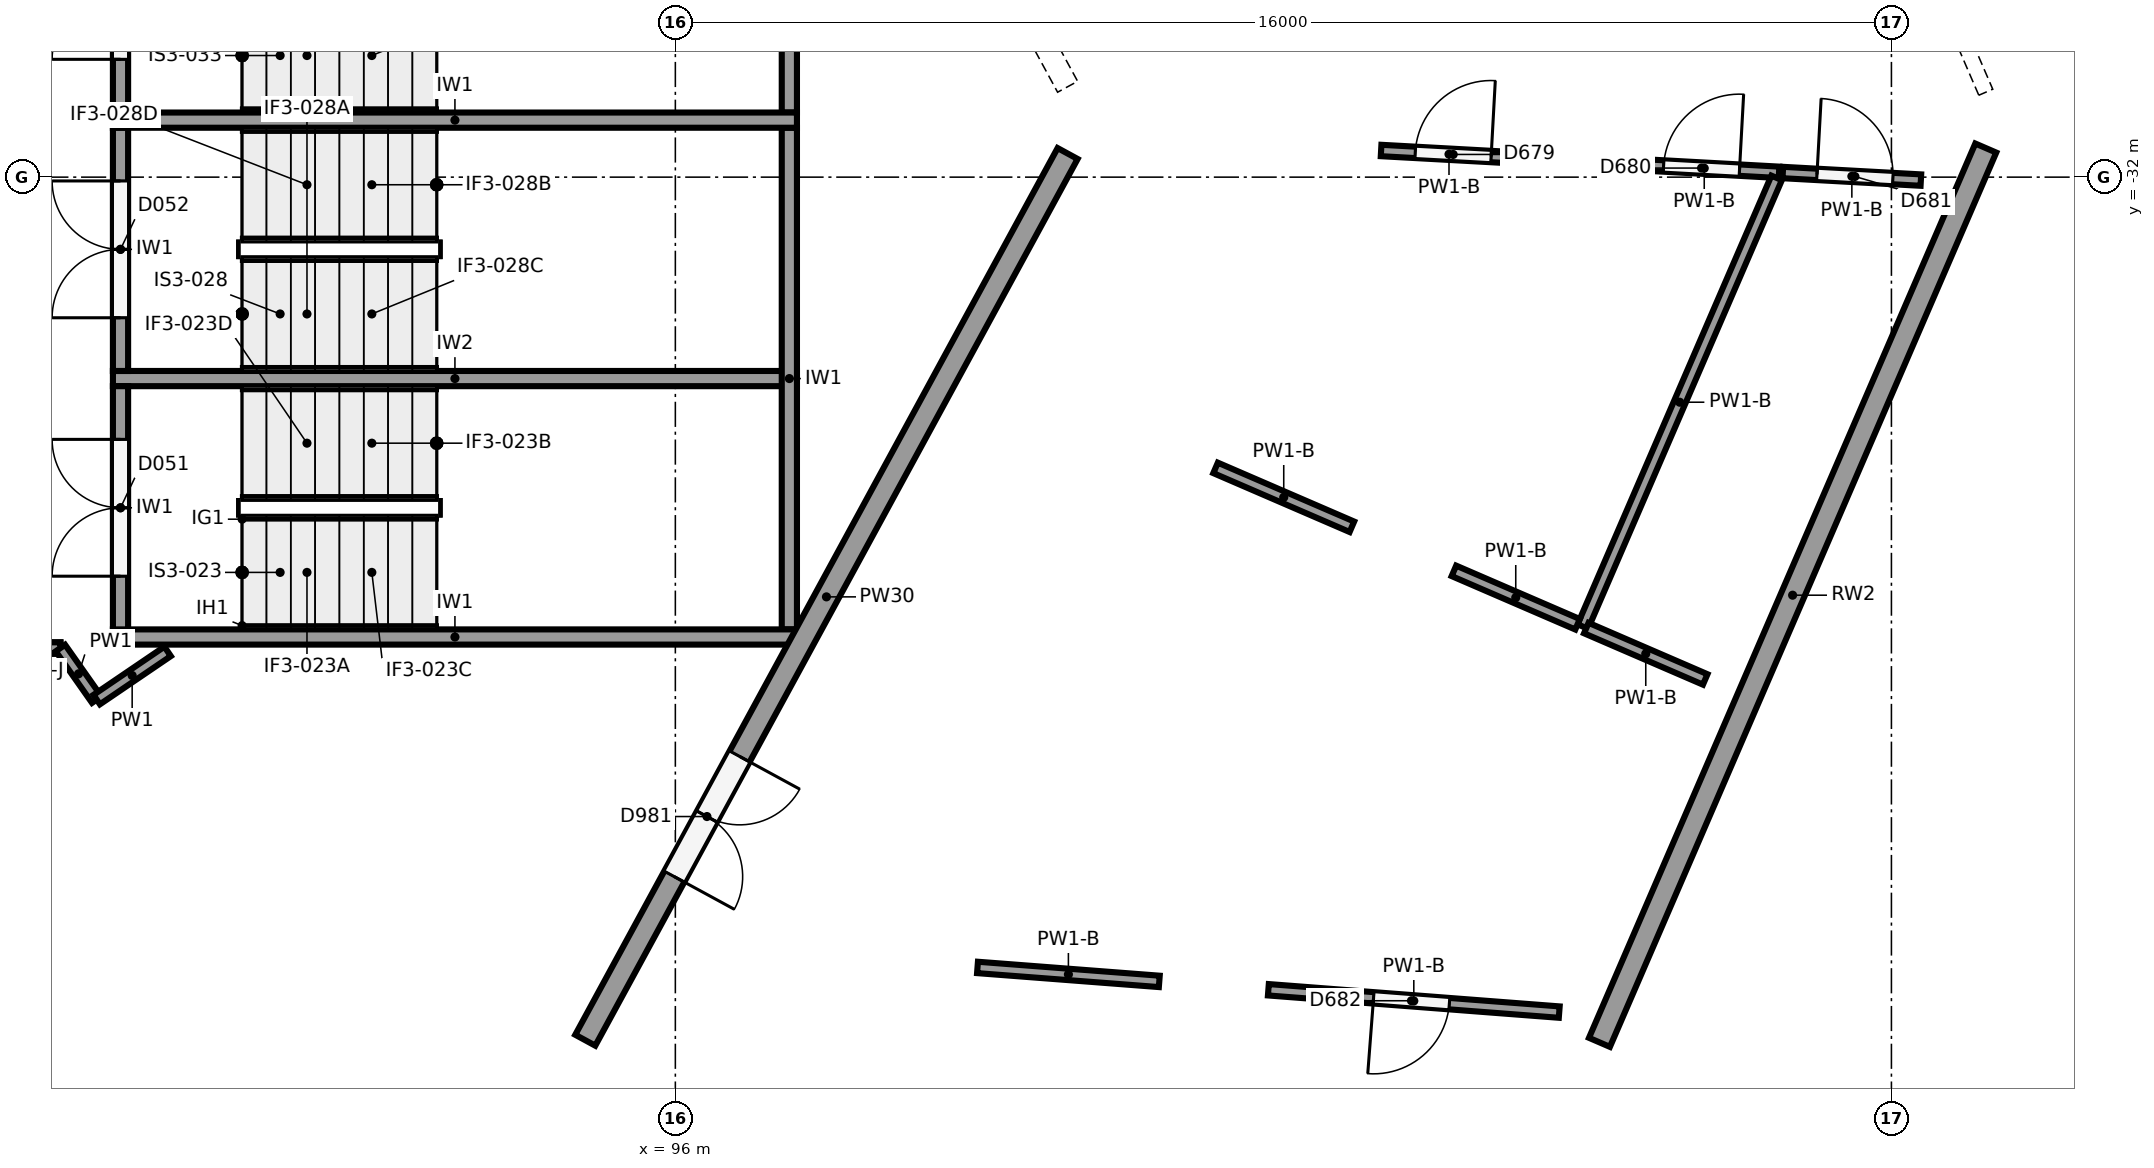
"""IFC4 building model, lengths in metres.
Left out: names, types, materials, properties, quantities, classifications, styles, units other than length and angle.
Written with IfcOpenShell. Run it as: python <this file> out.ifc"""

import sys

from ifc_helpers import new_model, si_unit, direction, frame, frame_2d, origin, origin_2d, place, context, subcontext, project, spatial, rectangle, circle, extrude, element, fill, save


model = new_model("IFC4")
c1 = context("Model", 3, precision=1e-05, world=origin(), true_north=direction((0.0, 1.0)))
c2 = subcontext(c1, "Body", "Model", "MODEL_VIEW")
j1 = project(units=[si_unit("LENGTHUNIT", "METRE"), si_unit("PLANEANGLEUNIT", "RADIAN")], contexts=[c1])
p1 = place(None, origin())
s1 = spatial("IfcSite", under=j1, at=p1, CompositionType="ELEMENT")
p2 = place(p1, origin())
s2 = spatial("IfcBuilding", under=s1, at=p2, CompositionType="ELEMENT")
p3 = place(p2, frame((0.0, 0.0, 6.5)))
s3 = spatial("IfcBuildingStorey", under=s2, at=p3, CompositionType="ELEMENT", Elevation=6.5)
p4 = place(p3, frame((94.6, -43.75, 0.0), z_axis=(0.0, 0.0, 1.0), x_axis=(1.0, 0.0, 0.0)))
e1 = element("IfcColumn", 1, at=p4, inside=s3, PredefinedType="COLUMN", context=c2, shape_type="SweptSolid", body=[
    extrude(circle(Radius=0.45, at=origin_2d()), origin(), (0.0, 0.0, 1.0), 5.5),
])
p5 = place(p3, frame((101.4, -31.25, 0.0), z_axis=(0.0, 0.0, 1.0), x_axis=(1.0, 0.0, 0.0)))
e2 = element("IfcColumn", 2, at=p5, inside=s3, PredefinedType="COLUMN", context=c2, shape_type="SweptSolid", body=[
    extrude(circle(Radius=0.5, at=origin_2d()), origin(), (0.0, 0.0, 1.0), 5.5),
])
for number, where, z_axis, x_axis in (
    (3, (98.6, -43.75, 0.0), (0.0, 0.0, 1.0), (1.0, 0.0, 0.0)),
    (4, (102.6, -43.75, 0.0), (0.0, 0.0, 1.0), (1.0, 0.0, 0.0)),
    (5, (108.0, -43.75, 0.0), (0.0, 0.0, 1.0), (1.0, 0.0, 0.0)),
    (6, (104.7, -31.25, 0.0), (0.0, 0.0, 1.0), (1.0, 0.0, 0.0)),
    (7, (108.0, -31.25, 0.0), (0.0, 0.0, 1.0), (1.0, 0.0, 0.0)),
    (8, (113.4, -31.25, 0.0), (0.0, 0.0, 1.0), (1.0, 0.0, 0.0)),
):
    element("IfcColumn", number, at=place(p3, frame(where, z_axis=z_axis, x_axis=x_axis)), inside=s3, PredefinedType="COLUMN", context=c2, shape_type="SweptSolid", body=[
        extrude(circle(Radius=0.4, at=origin_2d()), origin(), (0.0, 0.0, 1.0), 5.5),
    ])
p6 = place(p3, frame((113.241, -31.617, 0.0), z_axis=(0.0, 0.0, 1.0), x_axis=(-0.396577588261, -0.918001207237, 0.0)))
e9 = element("IfcWall", 9, at=p6, inside=s3, PredefinedType="SOLIDWALL", context=c2, shape_type="SweptSolid", body=[
    extrude(rectangle(XDim=12.817, YDim=0.3, at=frame_2d((6.408, 0.0))), origin(), (0.0, 0.0, 1.0), 3.85),
])
p7 = place(p3, frame((101.161, -31.689, 0.0), z_axis=(0.0, 0.0, 1.0), x_axis=(-0.477867771117, -0.878431780691, 0.0)))
e10 = element("IfcWall", 10, at=p7, inside=s3, PredefinedType="SOLIDWALL", context=c2, shape_type="SweptSolid", body=[
    extrude(rectangle(XDim=13.28, YDim=0.3, at=frame_2d((6.64, 0.0))), origin(), (0.0, 0.0, 1.0), 3.85),
])
p8 = place(p7, frame((9.03, 0.0, 0.0)))
e11 = element("IfcOpeningElement", 11, at=p8, cuts=e10, PredefinedType="OPENING", context=c2, shape_type="SweptSolid", body=[
    extrude(rectangle(XDim=1.8, YDim=2.4, at=frame_2d((0.9, 1.2))), frame((0.0, 0.16, 0.0), z_axis=(0.0, -1.0, 0.0), x_axis=(1.0, 0.0, 0.0)), (0.0, 0.0, 1.0), 0.32),
])
p9 = place(p3, frame((94.815, -19.145, 0.0), z_axis=(0.0, 0.0, 1.0), x_axis=(0.477867771117, -0.878431780691, 0.0)))
e12 = element("IfcWall", 12, at=p9, inside=s3, PredefinedType="SOLIDWALL", context=c2, shape_type="SweptSolid", body=[
    extrude(rectangle(XDim=13.28, YDim=0.3, at=frame_2d((6.64, 0.0))), origin(), (0.0, 0.0, 1.0), 3.85),
])
for number, where, z_axis, x_axis in (
    (13, (97.6, -38.05, 0.0), (0.0, 0.0, 1.0), (-1.0, 0.0, 0.0)),
    (14, (97.6, -31.25, 0.0), (0.0, 0.0, 1.0), (-1.0, 0.0, 0.0)),
):
    element("IfcWall", number, at=place(p3, frame(where, z_axis=z_axis, x_axis=x_axis)), inside=s3, PredefinedType="SHEAR", context=c2, shape_type="SweptSolid", body=[
        extrude(rectangle(XDim=9.0, YDim=0.2, at=frame_2d((4.5, 0.0))), origin(), (0.0, 0.0, 1.0), 5.15),
    ])
for number, where, z_axis, x_axis in (
    (15, (97.5, -37.95, 0.0), (0.0, 0.0, 1.0), (0.0, 1.0, 0.0)),
    (16, (97.5, -31.15, 0.0), (0.0, 0.0, 1.0), (0.0, 1.0, 0.0)),
):
    element("IfcWall", number, at=place(p3, frame(where, z_axis=z_axis, x_axis=x_axis)), inside=s3, PredefinedType="SHEAR", context=c2, shape_type="SweptSolid", body=[
        extrude(rectangle(XDim=6.6, YDim=0.2, at=frame_2d((3.3, 0.0))), origin(), (0.0, 0.0, 1.0), 5.15),
    ])
p10 = place(p3, frame((97.6, -34.65, 0.0), z_axis=(0.0, 0.0, 1.0), x_axis=(-1.0, 0.0, 0.0)))
e17 = element("IfcWall", 17, at=p10, inside=s3, PredefinedType="SHEAR", context=c2, shape_type="SweptSolid", body=[
    extrude(rectangle(XDim=9.0, YDim=0.2, at=frame_2d((4.5, 0.0))), origin(), (0.0, 0.0, 1.0), 5.15),
])
p11 = place(p3, frame((88.7, -37.95, 0.0), z_axis=(0.0, 0.0, 1.0), x_axis=(0.0, 1.0, 0.0)))
e18 = element("IfcWall", 18, at=p11, inside=s3, PredefinedType="SHEAR", context=c2, shape_type="SweptSolid", body=[
    extrude(rectangle(XDim=3.2, YDim=0.2, at=frame_2d((1.6, 0.0))), origin(), (0.0, 0.0, 1.0), 5.15),
])
p12 = place(p11, frame((0.7, 0.0, 0.0)))
e19 = element("IfcOpeningElement", 19, at=p12, cuts=e18, PredefinedType="OPENING", context=c2, shape_type="SweptSolid", body=[
    extrude(rectangle(XDim=1.8, YDim=2.1, at=frame_2d((0.9, 1.05))), frame((0.0, 0.11, 0.0), z_axis=(0.0, -1.0, 0.0), x_axis=(1.0, 0.0, 0.0)), (0.0, 0.0, 1.0), 0.22),
])
p13 = place(p3, frame((88.7, -34.55, 0.0), z_axis=(0.0, 0.0, 1.0), x_axis=(0.0, 1.0, 0.0)))
e20 = element("IfcWall", 20, at=p13, inside=s3, PredefinedType="SHEAR", context=c2, shape_type="SweptSolid", body=[
    extrude(rectangle(XDim=3.2, YDim=0.2, at=frame_2d((1.6, 0.0))), origin(), (0.0, 0.0, 1.0), 5.15),
])
p14 = place(p13, frame((0.7, 0.0, 0.0)))
e21 = element("IfcOpeningElement", 21, at=p14, cuts=e20, PredefinedType="OPENING", context=c2, shape_type="SweptSolid", body=[
    extrude(rectangle(XDim=1.8, YDim=2.1, at=frame_2d((0.9, 1.05))), frame((0.0, 0.11, 0.0), z_axis=(0.0, -1.0, 0.0), x_axis=(1.0, 0.0, 0.0)), (0.0, 0.0, 1.0), 0.22),
])
p15 = place(p3, frame((88.7, -31.15, 0.0), z_axis=(0.0, 0.0, 1.0), x_axis=(0.0, 1.0, 0.0)))
e22 = element("IfcWall", 22, at=p15, inside=s3, PredefinedType="SHEAR", context=c2, shape_type="SweptSolid", body=[
    extrude(rectangle(XDim=3.2, YDim=0.2, at=frame_2d((1.6, 0.0))), origin(), (0.0, 0.0, 1.0), 5.15),
])
p16 = place(p15, frame((0.7, 0.0, 0.0)))
e23 = element("IfcOpeningElement", 23, at=p16, cuts=e22, PredefinedType="OPENING", context=c2, shape_type="SweptSolid", body=[
    extrude(rectangle(XDim=1.8, YDim=2.1, at=frame_2d((0.9, 1.05))), frame((0.0, 0.11, 0.0), z_axis=(0.0, -1.0, 0.0), x_axis=(1.0, 0.0, 0.0)), (0.0, 0.0, 1.0), 0.22),
])
p17 = place(p3, frame((105.286, -31.649, 0.0), z_axis=(0.0, 0.0, 1.0), x_axis=(0.998502458587, -0.054706856933, 0.0)))
e24 = element("IfcWall", 24, at=p17, inside=s3, PredefinedType="PARTITIONING", context=c2, shape_type="SweptSolid", body=[
    extrude(rectangle(XDim=1.79, YDim=0.15, at=frame_2d((0.895, 0.0))), origin(), (0.0, 0.0, 1.0), 5.05),
])
p18 = place(p17, frame((0.45, 0.0, 0.0)))
e25 = element("IfcOpeningElement", 25, at=p18, cuts=e24, PredefinedType="OPENING", context=c2, shape_type="SweptSolid", body=[
    extrude(rectangle(XDim=1.0, YDim=2.1, at=frame_2d((0.5, 1.05))), frame((0.0, 0.085, 0.0), z_axis=(0.0, -1.0, 0.0), x_axis=(1.0, 0.0, 0.0)), (0.0, 0.0, 1.0), 0.17),
])
p19 = place(p3, frame((104.901, -36.6, 0.0), z_axis=(0.0, 0.0, 1.0), x_axis=(-0.918023068361, 0.396526980113, 0.0)))
e26 = element("IfcWall", 26, at=p19, inside=s3, PredefinedType="PARTITIONING", context=c2, shape_type="SweptSolid", body=[
    extrude(rectangle(XDim=1.954, YDim=0.15, at=frame_2d((0.977, 0.0))), origin(), (0.0, 0.0, 1.0), 5.05),
])
p20 = place(p3, frame((108.553, -31.829, 0.0), z_axis=(0.0, 0.0, 1.0), x_axis=(0.998500483488, -0.054742894282, 0.0)))
e27 = element("IfcWall", 27, at=p20, inside=s3, PredefinedType="PARTITIONING", context=c2, shape_type="SweptSolid", body=[
    extrude(rectangle(XDim=1.971, YDim=0.15, at=frame_2d((0.986, 0.0))), origin(), (0.0, 0.0, 1.0), 5.05),
])
p21 = place(p20, frame((0.45, 0.0, 0.0)))
e28 = element("IfcOpeningElement", 28, at=p21, cuts=e27, PredefinedType="OPENING", context=c2, shape_type="SweptSolid", body=[
    extrude(rectangle(XDim=1.0, YDim=2.1, at=frame_2d((0.5, 1.05))), frame((0.0, 0.085, 0.0), z_axis=(0.0, -1.0, 0.0), x_axis=(1.0, 0.0, 0.0)), (0.0, 0.0, 1.0), 0.17),
])
p22 = place(p3, frame((110.49, -32.01, 0.0), z_axis=(0.0, 0.0, 1.0), x_axis=(-0.396561841895, -0.918008009526, 0.0)))
e29 = element("IfcWall", 29, at=p22, inside=s3, PredefinedType="PARTITIONING", context=c2, shape_type="SweptSolid", body=[
    extrude(rectangle(XDim=6.43, YDim=0.15, at=frame_2d((3.215, 0.0))), origin(), (0.0, 0.0, 1.0), 5.05),
])
p23 = place(p3, frame((107.871, -37.883, 0.0), z_axis=(0.0, 0.0, 1.0), x_axis=(-0.917965489949, 0.396660256722, 0.0)))
e30 = element("IfcWall", 30, at=p23, inside=s3, PredefinedType="PARTITIONING", context=c2, shape_type="SweptSolid", body=[
    extrude(rectangle(XDim=1.773, YDim=0.15, at=frame_2d((0.886, 0.0))), origin(), (0.0, 0.0, 1.0), 5.05),
])
p24 = place(p3, frame((109.55, -38.608, 0.0), z_axis=(0.0, 0.0, 1.0), x_axis=(-0.91801494681, 0.396545782267, 0.0)))
e31 = element("IfcWall", 31, at=p24, inside=s3, PredefinedType="PARTITIONING", context=c2, shape_type="SweptSolid", body=[
    extrude(rectangle(XDim=1.704, YDim=0.15, at=frame_2d((0.852, 0.0))), origin(), (0.0, 0.0, 1.0), 5.05),
])
p25 = place(p3, frame((110.571, -31.939, 0.0), z_axis=(0.0, 0.0, 1.0), x_axis=(0.998499338423, -0.054763776055, 0.0)))
e32 = element("IfcWall", 32, at=p25, inside=s3, PredefinedType="PARTITIONING", context=c2, shape_type="SweptSolid", body=[
    extrude(rectangle(XDim=1.819, YDim=0.15, at=frame_2d((0.909, 0.0))), origin(), (0.0, 0.0, 1.0), 5.05),
])
p26 = place(p25, frame((0.45, 0.0, 0.0)))
e33 = element("IfcOpeningElement", 33, at=p26, cuts=e32, PredefinedType="OPENING", context=c2, shape_type="SweptSolid", body=[
    extrude(rectangle(XDim=1.0, YDim=2.1, at=frame_2d((0.5, 1.05))), frame((0.0, 0.085, 0.0), z_axis=(0.0, -1.0, 0.0), x_axis=(1.0, 0.0, 0.0)), (0.0, 0.0, 1.0), 0.17),
])
p27 = place(p3, frame((107.629, -42.985, 0.0), z_axis=(0.0, 0.0, 1.0), x_axis=(-0.997067940223, 0.076521386417, 0.0)))
e34 = element("IfcWall", 34, at=p27, inside=s3, PredefinedType="PARTITIONING", context=c2, shape_type="SweptSolid", body=[
    extrude(rectangle(XDim=3.838, YDim=0.15, at=frame_2d((1.919, 0.0))), origin(), (0.0, 0.0, 1.0), 5.05),
])
p28 = place(p27, frame((1.45, 0.0, 0.0)))
e35 = element("IfcOpeningElement", 35, at=p28, cuts=e34, PredefinedType="OPENING", context=c2, shape_type="SweptSolid", body=[
    extrude(rectangle(XDim=1.0, YDim=2.1, at=frame_2d((0.5, 1.05))), frame((0.0, 0.085, 0.0), z_axis=(0.0, -1.0, 0.0), x_axis=(1.0, 0.0, 0.0)), (0.0, 0.0, 1.0), 0.17),
])
p29 = place(p3, frame((102.367, -42.581, 0.0), z_axis=(0.0, 0.0, 1.0), x_axis=(-0.997066447822, 0.076540829804, 0.0)))
e36 = element("IfcWall", 36, at=p29, inside=s3, PredefinedType="PARTITIONING", context=c2, shape_type="SweptSolid", body=[
    extrude(rectangle(XDim=2.399, YDim=0.15, at=frame_2d((1.199, 0.0))), origin(), (0.0, 0.0, 1.0), 5.05),
])
p30 = place(p3, frame((81.555, -38.195, 0.0), z_axis=(0.0, 0.0, 1.0), x_axis=(1.0, 0.0, 0.0)))
e37 = element("IfcWall", 37, at=p30, inside=s3, PredefinedType="PARTITIONING", context=c2, shape_type="SweptSolid", body=[
    extrude(rectangle(XDim=6.354, YDim=0.15, at=frame_2d((3.177, 0.0))), origin(), (0.0, 0.0, 1.0), 3.85),
])
p31 = place(p30, frame((3.85, 0.0, 0.0)))
e38 = element("IfcOpeningElement", 38, at=p31, cuts=e37, PredefinedType="OPENING", context=c2, shape_type="SweptSolid", body=[
    extrude(rectangle(XDim=1.8, YDim=2.1, at=frame_2d((0.9, 1.05))), frame((0.0, 0.085, 0.0), z_axis=(0.0, -1.0, 0.0), x_axis=(1.0, 0.0, 0.0)), (0.0, 0.0, 1.0), 0.17),
])
p32 = place(p3, frame((87.255, -38.195, 3.85), z_axis=(0.0, 0.0, 1.0), x_axis=(1.0, 0.0, 0.0)))
e39 = element("IfcWall", 39, at=p32, inside=s3, PredefinedType="PARTITIONING", context=c2, shape_type="SweptSolid", body=[
    extrude(rectangle(XDim=0.654, YDim=0.15, at=frame_2d((0.327, 0.0))), origin(), (0.0, 0.0, 1.0), 1.3),
])
p33 = place(p3, frame((87.909, -38.195, 0.0), z_axis=(0.0, 0.0, 1.0), x_axis=(0.575573582652, -0.81774999294, 0.0)))
e40 = element("IfcWall", 40, at=p33, inside=s3, PredefinedType="PARTITIONING", context=c2, shape_type="SweptSolid", body=[
    extrude(rectangle(XDim=0.83, YDim=0.15, at=frame_2d((0.415, 0.0))), origin(), (0.0, 0.0, 1.0), 5.15),
])
p34 = place(p3, frame((88.387, -38.874, 0.0), z_axis=(0.0, 0.0, 1.0), x_axis=(0.827055308354, 0.562120553728, 0.0)))
e41 = element("IfcWall", 41, at=p34, inside=s3, PredefinedType="PARTITIONING", context=c2, shape_type="SweptSolid", body=[
    extrude(rectangle(XDim=1.128, YDim=0.15, at=frame_2d((0.564, 0.0))), origin(), (0.0, 0.0, 1.0), 5.15),
])
p35 = place(p8, origin())
e42 = element("IfcDoor", 42, at=p35, inside=s3, OperationType="DOUBLE_DOOR_SINGLE_SWING", PredefinedType="DOOR", context=c2, shape_type="SweptSolid", body=[
    extrude(rectangle(XDim=1.8, YDim=2.4, at=frame_2d((0.9, 1.2))), frame((0.0, 0.025, 0.0), z_axis=(0.0, -1.0, 0.0), x_axis=(1.0, 0.0, 0.0)), (0.0, 0.0, 1.0), 0.05),
])
fill(e11, e42)
p36 = place(p12, origin())
e43 = element("IfcDoor", 43, at=p36, inside=s3, OperationType="DOUBLE_DOOR_SINGLE_SWING", PredefinedType="DOOR", context=c2, shape_type="SweptSolid", body=[
    extrude(rectangle(XDim=1.8, YDim=2.1, at=frame_2d((0.9, 1.05))), frame((0.0, 0.025, 0.0), z_axis=(0.0, -1.0, 0.0), x_axis=(1.0, 0.0, 0.0)), (0.0, 0.0, 1.0), 0.05),
])
fill(e19, e43)
p37 = place(p14, origin())
e44 = element("IfcDoor", 44, at=p37, inside=s3, OperationType="DOUBLE_DOOR_SINGLE_SWING", PredefinedType="DOOR", context=c2, shape_type="SweptSolid", body=[
    extrude(rectangle(XDim=1.8, YDim=2.1, at=frame_2d((0.9, 1.05))), frame((0.0, 0.025, 0.0), z_axis=(0.0, -1.0, 0.0), x_axis=(1.0, 0.0, 0.0)), (0.0, 0.0, 1.0), 0.05),
])
fill(e21, e44)
p38 = place(p16, origin())
e45 = element("IfcDoor", 45, at=p38, inside=s3, OperationType="DOUBLE_DOOR_SINGLE_SWING", PredefinedType="DOOR", context=c2, shape_type="SweptSolid", body=[
    extrude(rectangle(XDim=1.8, YDim=2.1, at=frame_2d((0.9, 1.05))), frame((0.0, 0.025, 0.0), z_axis=(0.0, -1.0, 0.0), x_axis=(1.0, 0.0, 0.0)), (0.0, 0.0, 1.0), 0.05),
])
fill(e23, e45)
p39 = place(p18, origin())
e46 = element("IfcDoor", 46, at=p39, inside=s3, OperationType="SINGLE_SWING_RIGHT", PredefinedType="DOOR", context=c2, shape_type="SweptSolid", body=[
    extrude(rectangle(XDim=1.0, YDim=2.1, at=frame_2d((0.5, 1.05))), frame((0.0, 0.025, 0.0), z_axis=(0.0, -1.0, 0.0), x_axis=(1.0, 0.0, 0.0)), (0.0, 0.0, 1.0), 0.05),
])
fill(e25, e46)
p40 = place(p21, origin())
e47 = element("IfcDoor", 47, at=p40, inside=s3, OperationType="SINGLE_SWING_RIGHT", PredefinedType="DOOR", context=c2, shape_type="SweptSolid", body=[
    extrude(rectangle(XDim=1.0, YDim=2.1, at=frame_2d((0.5, 1.05))), frame((0.0, 0.025, 0.0), z_axis=(0.0, -1.0, 0.0), x_axis=(1.0, 0.0, 0.0)), (0.0, 0.0, 1.0), 0.05),
])
fill(e28, e47)
p41 = place(p26, origin())
e48 = element("IfcDoor", 48, at=p41, inside=s3, OperationType="SINGLE_SWING_LEFT", PredefinedType="DOOR", context=c2, shape_type="SweptSolid", body=[
    extrude(rectangle(XDim=1.0, YDim=2.1, at=frame_2d((0.5, 1.05))), frame((0.0, 0.025, 0.0), z_axis=(0.0, -1.0, 0.0), x_axis=(1.0, 0.0, 0.0)), (0.0, 0.0, 1.0), 0.05),
])
fill(e33, e48)
p42 = place(p28, origin())
e49 = element("IfcDoor", 49, at=p42, inside=s3, OperationType="SINGLE_SWING_RIGHT", PredefinedType="DOOR", context=c2, shape_type="SweptSolid", body=[
    extrude(rectangle(XDim=1.0, YDim=2.1, at=frame_2d((0.5, 1.05))), frame((0.0, 0.025, 0.0), z_axis=(0.0, -1.0, 0.0), x_axis=(1.0, 0.0, 0.0)), (0.0, 0.0, 1.0), 0.05),
])
fill(e35, e49)
save(model, sys.argv[1])
